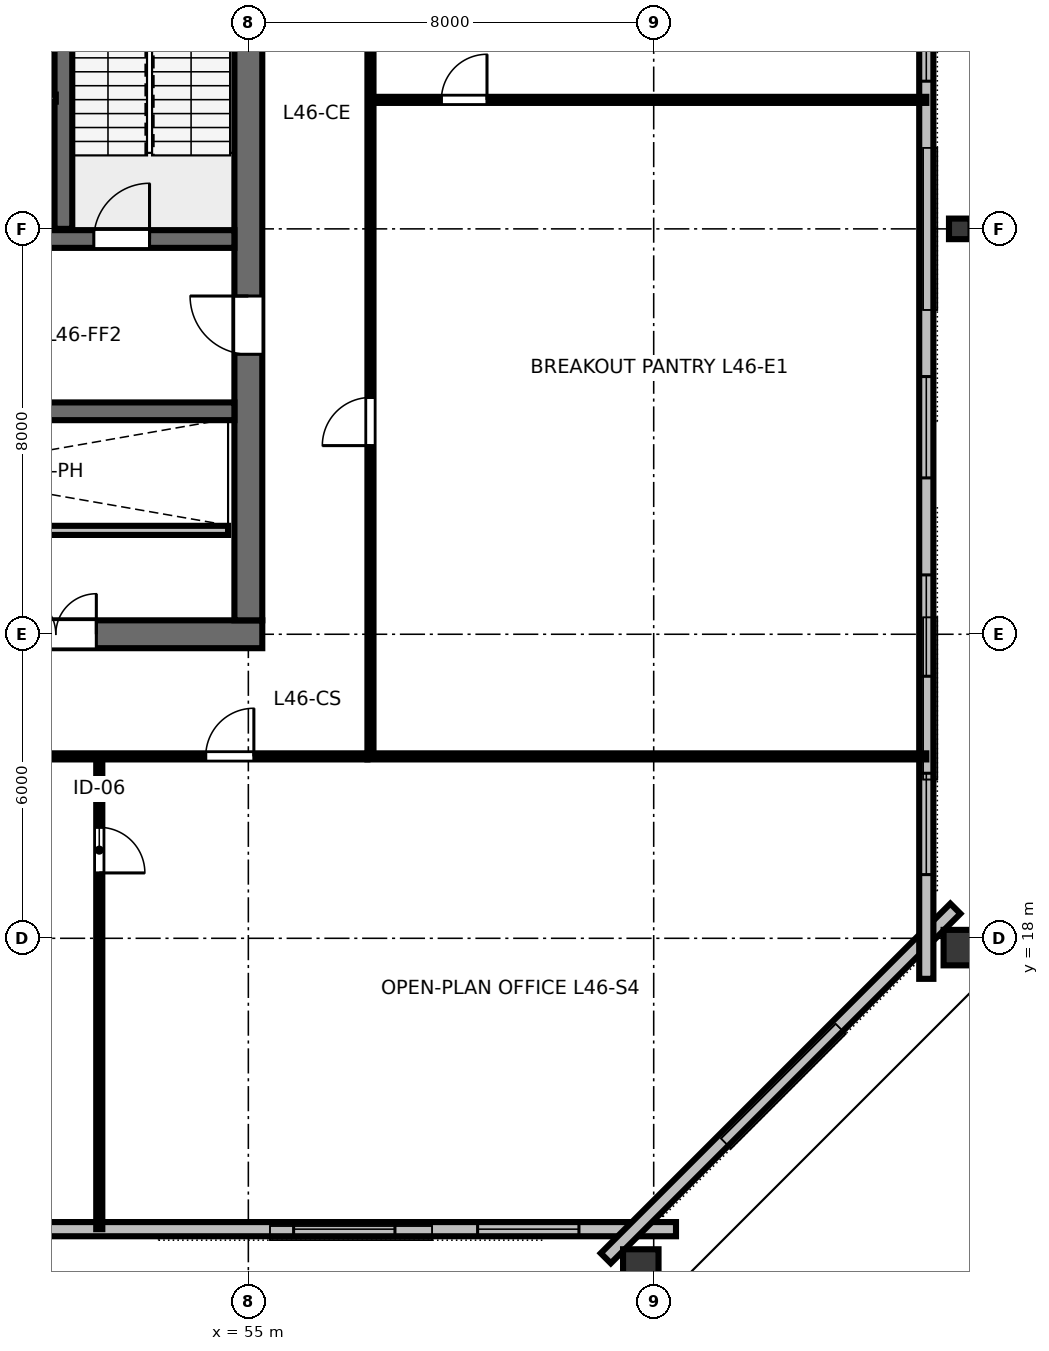
"""IFC4 building model, lengths in metres.
Left out: names, types, materials, properties, quantities, classifications, styles, units other than length and angle.
Written with IfcOpenShell. Run it as: python <this file> out.ifc"""

import sys

from ifc_helpers import new_model, si_unit, direction, frame, frame_2d, origin, origin_2d, place, context, subcontext, project, spatial, rectangle, hollow_rectangle, i_section, extrude, element, fill, save


model = new_model("IFC4")
c1 = context("Model", 3, precision=1e-05, world=origin(), true_north=direction((0.0, 1.0)))
c2 = subcontext(c1, "Body", "Model", "MODEL_VIEW")
j1 = project(units=[si_unit("LENGTHUNIT", "METRE"), si_unit("PLANEANGLEUNIT", "RADIAN")], contexts=[c1])
p1 = place(None, origin())
s1 = spatial("IfcSite", under=j1, at=p1, CompositionType="ELEMENT")
p2 = place(p1, origin())
s2 = spatial("IfcBuilding", under=s1, at=p2, CompositionType="ELEMENT")
p3 = place(p2, frame((0.0, 0.0, 177.0)))
s3 = spatial("IfcBuildingStorey", under=s2, at=p3, CompositionType="ELEMENT", Elevation=177.0)
p4 = place(p3, frame((36.725, 24.0, 0.0), z_axis=(0.0, 0.0, 1.0), x_axis=(1.0, 0.0, 0.0)))
e1 = element("IfcWall", 1, at=p4, inside=s3, PredefinedType="SHEAR", context=c2, shape_type="SweptSolid", body=[
    extrude(rectangle(XDim=18.55, YDim=0.55, at=frame_2d((9.275, 0.0))), origin(), (0.0, 0.0, 1.0), 3.36),
])
p5 = place(p4, frame((8.275, 0.0, 0.0)))
e2 = element("IfcOpeningElement", 2, at=p5, cuts=e1, PredefinedType="OPENING", context=c2, shape_type="SweptSolid", body=[
    extrude(rectangle(XDim=1.6, YDim=2.15, at=frame_2d((0.8, 1.075))), frame((0.0, 0.285, 0.0), z_axis=(0.0, -1.0, 0.0), x_axis=(1.0, 0.0, 0.0)), (0.0, 0.0, 1.0), 0.57),
])
p6 = place(p4, frame((13.675, 0.0, 0.0)))
e3 = element("IfcOpeningElement", 3, at=p6, cuts=e1, PredefinedType="OPENING", context=c2, shape_type="SweptSolid", body=[
    extrude(rectangle(XDim=1.6, YDim=2.15, at=frame_2d((0.8, 1.075))), frame((0.0, 0.285, 0.0), z_axis=(0.0, -1.0, 0.0), x_axis=(1.0, 0.0, 0.0)), (0.0, 0.0, 1.0), 0.57),
])
p7 = place(p3, frame((55.0, 24.275, 0.0), z_axis=(0.0, 0.0, 1.0), x_axis=(0.0, 1.0, 0.0)))
e4 = element("IfcWall", 4, at=p7, inside=s3, PredefinedType="SHEAR", context=c2, shape_type="SweptSolid", body=[
    extrude(rectangle(XDim=15.45, YDim=0.55, at=frame_2d((7.725, 0.0))), origin(), (0.0, 0.0, 1.0), 3.36),
])
p8 = place(p7, frame((5.25, 0.0, 0.0)))
e5 = element("IfcOpeningElement", 5, at=p8, cuts=e4, PredefinedType="OPENING", context=c2, shape_type="SweptSolid", body=[
    extrude(rectangle(XDim=1.15, YDim=2.15, at=frame_2d((0.575, 1.075))), frame((0.0, 0.285, 0.0), z_axis=(0.0, -1.0, 0.0), x_axis=(1.0, 0.0, 0.0)), (0.0, 0.0, 1.0), 0.57),
])
p9 = place(p3, frame((37.275, 31.8, 0.0), z_axis=(0.0, 0.0, 1.0), x_axis=(1.0, 0.0, 0.0)))
e6 = element("IfcWall", 6, at=p9, inside=s3, PredefinedType="SHEAR", context=c2, shape_type="SweptSolid", body=[
    extrude(rectangle(XDim=17.45, YDim=0.35, at=frame_2d((8.725, 0.0))), origin(), (0.0, 0.0, 1.0), 3.36),
])
p10 = place(p9, frame((0.775, 0.0, 0.0)))
e7 = element("IfcOpeningElement", 7, at=p10, cuts=e6, PredefinedType="OPENING", context=c2, shape_type="SweptSolid", body=[
    extrude(rectangle(XDim=1.1, YDim=2.15, at=frame_2d((0.55, 1.075))), frame((0.0, 0.185, 0.0), z_axis=(0.0, -1.0, 0.0), x_axis=(1.0, 0.0, 0.0)), (0.0, 0.0, 1.0), 0.37),
])
p11 = place(p9, frame((14.675, 0.0, 0.0)))
e8 = element("IfcOpeningElement", 8, at=p11, cuts=e6, PredefinedType="OPENING", context=c2, shape_type="SweptSolid", body=[
    extrude(rectangle(XDim=1.1, YDim=2.15, at=frame_2d((0.55, 1.075))), frame((0.0, 0.185, 0.0), z_axis=(0.0, -1.0, 0.0), x_axis=(1.0, 0.0, 0.0)), (0.0, 0.0, 1.0), 0.37),
])
p12 = place(p3, frame((37.275, 28.4, 0.0), z_axis=(0.0, 0.0, 1.0), x_axis=(1.0, 0.0, 0.0)))
e9 = element("IfcWall", 9, at=p12, inside=s3, PredefinedType="SHEAR", context=c2, shape_type="SweptSolid", body=[
    extrude(rectangle(XDim=17.45, YDim=0.35, at=frame_2d((8.725, 0.0))), origin(), (0.0, 0.0, 1.0), 3.36),
])
for number, where, z_axis, x_axis in (
    (10, (62.745, 11.438, 0.0), (0.0, 0.0, 1.0), (1.0, 0.0, 0.0)),
    (11, (69.146, 17.816, 0.0), (0.0, 0.0, 1.0), (0.0, 1.0, 0.0)),
):
    element("IfcColumn", number, at=place(p3, frame(where, z_axis=z_axis, x_axis=x_axis)), inside=s3, PredefinedType="COLUMN", context=c2, shape_type="SweptSolid", body=[
        extrude(hollow_rectangle(XDim=0.7, YDim=0.85, WallThickness=0.04, at=origin_2d()), origin(), (0.0, 0.0, 1.0), 3.358),
    ])
p13 = place(p3, frame((69.04, 32.0, 0.0), z_axis=(0.0, 0.0, 1.0), x_axis=(0.0, 1.0, 0.0)))
e12 = element("IfcColumn", 12, at=p13, inside=s3, PredefinedType="COLUMN", context=c2, shape_type="SweptSolid", body=[
    extrude(i_section(OverallWidth=0.406, OverallDepth=0.425, WebThickness=0.033, FlangeThickness=0.052, FilletRadius=0.025, at=origin_2d()), origin(), (0.0, 0.0, 1.0), 3.358),
])
p14 = place(p3, frame((28.56, 12.26, 0.0), z_axis=(0.0, 0.0, 1.0), x_axis=(1.0, 0.0, 0.0)))
e13 = element("IfcWall", 13, at=p14, inside=s3, PredefinedType="STANDARD", context=c2, shape_type="SweptSolid", body=[
    extrude(rectangle(XDim=34.88, YDim=0.28, at=frame_2d((17.44, 0.0))), origin(), (0.0, 0.0, 1.0), 3.36),
])
p15 = place(p14, frame((1.916, 0.0, 0.8)))
e14 = element("IfcOpeningElement", 14, at=p15, cuts=e13, PredefinedType="OPENING", context=c2, shape_type="SweptSolid", body=[
    extrude(rectangle(XDim=2.0, YDim=1.95, at=frame_2d((1.0, 0.975))), frame((0.0, 0.15, 0.0), z_axis=(0.0, -1.0, 0.0), x_axis=(1.0, 0.0, 0.0)), (0.0, 0.0, 1.0), 0.3),
])
p16 = place(p14, frame((5.547, 0.0, 0.8)))
e15 = element("IfcOpeningElement", 15, at=p16, cuts=e13, PredefinedType="OPENING", context=c2, shape_type="SweptSolid", body=[
    extrude(rectangle(XDim=2.0, YDim=1.95, at=frame_2d((1.0, 0.975))), frame((0.0, 0.15, 0.0), z_axis=(0.0, -1.0, 0.0), x_axis=(1.0, 0.0, 0.0)), (0.0, 0.0, 1.0), 0.3),
])
p17 = place(p14, frame((9.178, 0.0, 0.8)))
e16 = element("IfcOpeningElement", 16, at=p17, cuts=e13, PredefinedType="OPENING", context=c2, shape_type="SweptSolid", body=[
    extrude(rectangle(XDim=2.0, YDim=1.95, at=frame_2d((1.0, 0.975))), frame((0.0, 0.15, 0.0), z_axis=(0.0, -1.0, 0.0), x_axis=(1.0, 0.0, 0.0)), (0.0, 0.0, 1.0), 0.3),
])
p18 = place(p14, frame((20.071, 0.0, 0.8)))
e17 = element("IfcOpeningElement", 17, at=p18, cuts=e13, PredefinedType="OPENING", context=c2, shape_type="SweptSolid", body=[
    extrude(rectangle(XDim=2.0, YDim=1.95, at=frame_2d((1.0, 0.975))), frame((0.0, 0.15, 0.0), z_axis=(0.0, -1.0, 0.0), x_axis=(1.0, 0.0, 0.0)), (0.0, 0.0, 1.0), 0.3),
])
p19 = place(p14, frame((27.333, 0.0, 0.8)))
e18 = element("IfcOpeningElement", 18, at=p19, cuts=e13, PredefinedType="OPENING", context=c2, shape_type="SweptSolid", body=[
    extrude(rectangle(XDim=2.0, YDim=1.95, at=frame_2d((1.0, 0.975))), frame((0.0, 0.15, 0.0), z_axis=(0.0, -1.0, 0.0), x_axis=(1.0, 0.0, 0.0)), (0.0, 0.0, 1.0), 0.3),
])
p20 = place(p14, frame((30.964, 0.0, 0.8)))
e19 = element("IfcOpeningElement", 19, at=p20, cuts=e13, PredefinedType="OPENING", context=c2, shape_type="SweptSolid", body=[
    extrude(rectangle(XDim=2.0, YDim=1.95, at=frame_2d((1.0, 0.975))), frame((0.0, 0.15, 0.0), z_axis=(0.0, -1.0, 0.0), x_axis=(1.0, 0.0, 0.0)), (0.0, 0.0, 1.0), 0.3),
])
p21 = place(p3, frame((62.054, 11.686, 0.0), z_axis=(0.0, 0.0, 1.0), x_axis=(0.707106781187, 0.707106781187, 0.0)))
e20 = element("IfcWall", 20, at=p21, inside=s3, PredefinedType="STANDARD", context=c2, shape_type="SweptSolid", body=[
    extrude(rectangle(XDim=9.757, YDim=0.28, at=frame_2d((4.879, 0.0))), origin(), (0.0, 0.0, 1.0), 3.36),
])
p22 = place(p3, frame((68.38, 17.2, 0.0), z_axis=(0.0, 0.0, 1.0), x_axis=(0.0, 1.0, 0.0)))
e21 = element("IfcWall", 21, at=p22, inside=s3, PredefinedType="STANDARD", context=c2, shape_type="SweptSolid", body=[
    extrude(rectangle(XDim=29.6, YDim=0.28, at=frame_2d((14.8, 0.0))), origin(), (0.0, 0.0, 1.0), 3.36),
])
p23 = place(p22, frame((2.057, 0.0, 0.8)))
e22 = element("IfcOpeningElement", 22, at=p23, cuts=e21, PredefinedType="OPENING", context=c2, shape_type="SweptSolid", body=[
    extrude(rectangle(XDim=2.0, YDim=1.95, at=frame_2d((1.0, 0.975))), frame((0.0, 0.15, 0.0), z_axis=(0.0, -1.0, 0.0), x_axis=(1.0, 0.0, 0.0)), (0.0, 0.0, 1.0), 0.3),
])
p24 = place(p22, frame((5.971, 0.0, 0.8)))
e23 = element("IfcOpeningElement", 23, at=p24, cuts=e21, PredefinedType="OPENING", context=c2, shape_type="SweptSolid", body=[
    extrude(rectangle(XDim=2.0, YDim=1.95, at=frame_2d((1.0, 0.975))), frame((0.0, 0.15, 0.0), z_axis=(0.0, -1.0, 0.0), x_axis=(1.0, 0.0, 0.0)), (0.0, 0.0, 1.0), 0.3),
])
p25 = place(p22, frame((9.886, 0.0, 0.8)))
e24 = element("IfcOpeningElement", 24, at=p25, cuts=e21, PredefinedType="OPENING", context=c2, shape_type="SweptSolid", body=[
    extrude(rectangle(XDim=2.0, YDim=1.95, at=frame_2d((1.0, 0.975))), frame((0.0, 0.15, 0.0), z_axis=(0.0, -1.0, 0.0), x_axis=(1.0, 0.0, 0.0)), (0.0, 0.0, 1.0), 0.3),
])
p26 = place(p22, frame((17.714, 0.0, 0.8)))
e25 = element("IfcOpeningElement", 25, at=p26, cuts=e21, PredefinedType="OPENING", context=c2, shape_type="SweptSolid", body=[
    extrude(rectangle(XDim=2.0, YDim=1.95, at=frame_2d((1.0, 0.975))), frame((0.0, 0.15, 0.0), z_axis=(0.0, -1.0, 0.0), x_axis=(1.0, 0.0, 0.0)), (0.0, 0.0, 1.0), 0.3),
])
p27 = place(p22, frame((21.629, 0.0, 0.8)))
e26 = element("IfcOpeningElement", 26, at=p27, cuts=e21, PredefinedType="OPENING", context=c2, shape_type="SweptSolid", body=[
    extrude(rectangle(XDim=2.0, YDim=1.95, at=frame_2d((1.0, 0.975))), frame((0.0, 0.15, 0.0), z_axis=(0.0, -1.0, 0.0), x_axis=(1.0, 0.0, 0.0)), (0.0, 0.0, 1.0), 0.3),
])
p28 = place(p22, frame((25.543, 0.0, 0.8)))
e27 = element("IfcOpeningElement", 27, at=p28, cuts=e21, PredefinedType="OPENING", context=c2, shape_type="SweptSolid", body=[
    extrude(rectangle(XDim=2.0, YDim=1.95, at=frame_2d((1.0, 0.975))), frame((0.0, 0.15, 0.0), z_axis=(0.0, -1.0, 0.0), x_axis=(1.0, 0.0, 0.0)), (0.0, 0.0, 1.0), 0.3),
])
p29 = place(p3, frame((51.35, 32.0, 0.0), z_axis=(0.0, 0.0, 1.0), x_axis=(0.0, 1.0, 0.0)))
e28 = element("IfcWall", 28, at=p29, inside=s3, PredefinedType="SHEAR", context=c2, shape_type="SweptSolid", body=[
    extrude(rectangle(XDim=7.7, YDim=0.35, at=frame_2d((3.85, 0.0))), origin(), (0.0, 0.0, 1.0), 3.6),
])
p30 = place(p3, frame((48.8, 34.58, 0.0), z_axis=(0.0, 0.0, 1.0), x_axis=(1.0, 0.0, 0.0)))
e29 = element("IfcWall", 29, at=p30, inside=s3, PredefinedType="PARTITIONING", context=c2, shape_type="SweptSolid", body=[
    extrude(rectangle(XDim=2.4, YDim=0.14, at=frame_2d((1.2, 0.0))), origin(), (0.0, 0.0, 1.0), 3.36),
])
p31 = place(p3, frame((42.55, 26.05, 0.0), z_axis=(0.0, 0.0, 1.0), x_axis=(1.0, 0.0, 0.0)))
e30 = element("IfcWall", 30, at=p31, inside=s3, PredefinedType="PARTITIONING", context=c2, shape_type="SweptSolid", body=[
    extrude(rectangle(XDim=12.05, YDim=0.18, at=frame_2d((6.025, 0.0))), origin(), (0.0, 0.0, 1.0), 3.36),
])
p32 = place(p3, frame((52.058, 21.59, 0.0), z_axis=(0.0, 0.0, 1.0), x_axis=(0.0, -1.0, 0.0)))
e31 = element("IfcWall", 31, at=p32, inside=s3, PredefinedType="PARTITIONING", context=c2, shape_type="SweptSolid", body=[
    extrude(rectangle(XDim=9.33, YDim=0.12, at=frame_2d((4.665, 0.0))), origin(), (0.0, 0.0, 1.0), 2.64),
])
p33 = place(p32, frame((1.4, 0.0, 0.0)))
e32 = element("IfcOpeningElement", 32, at=p33, cuts=e31, PredefinedType="OPENING", context=c2, shape_type="SweptSolid", body=[
    extrude(rectangle(XDim=0.9, YDim=2.15, at=frame_2d((0.45, 1.075))), frame((0.0, 0.07, 0.0), z_axis=(0.0, -1.0, 0.0), x_axis=(1.0, 0.0, 0.0)), (0.0, 0.0, 1.0), 0.14),
])
p34 = place(p3, frame((47.02, 21.59, 0.0), z_axis=(0.0, 0.0, 1.0), x_axis=(1.0, 0.0, 0.0)))
e33 = element("IfcWall", 33, at=p34, inside=s3, PredefinedType="PARTITIONING", context=c2, shape_type="SweptSolid", body=[
    extrude(rectangle(XDim=10.33, YDim=0.12, at=frame_2d((5.165, 0.0))), origin(), (0.0, 0.0, 1.0), 2.64),
])
p35 = place(p34, frame((2.044, 0.0, 0.0)))
e34 = element("IfcOpeningElement", 34, at=p35, cuts=e33, PredefinedType="OPENING", context=c2, shape_type="SweptSolid", body=[
    extrude(rectangle(XDim=0.95, YDim=2.15, at=frame_2d((0.475, 1.075))), frame((0.0, 0.07, 0.0), z_axis=(0.0, -1.0, 0.0), x_axis=(1.0, 0.0, 0.0)), (0.0, 0.0, 1.0), 0.14),
])
p36 = place(p34, frame((7.139, 0.0, 0.0)))
e35 = element("IfcOpeningElement", 35, at=p36, cuts=e33, PredefinedType="OPENING", context=c2, shape_type="SweptSolid", body=[
    extrude(rectangle(XDim=0.95, YDim=2.15, at=frame_2d((0.475, 1.075))), frame((0.0, 0.07, 0.0), z_axis=(0.0, -1.0, 0.0), x_axis=(1.0, 0.0, 0.0)), (0.0, 0.0, 1.0), 0.14),
])
p37 = place(p3, frame((57.41, 34.546, 0.0), z_axis=(0.0, 0.0, 1.0), x_axis=(1.0, 0.0, 0.0)))
e36 = element("IfcWall", 36, at=p37, inside=s3, PredefinedType="PARTITIONING", context=c2, shape_type="SweptSolid", body=[
    extrude(rectangle(XDim=10.97, YDim=0.12, at=frame_2d((5.485, 0.0))), origin(), (0.0, 0.0, 1.0), 2.64),
])
p38 = place(p37, frame((1.4, 0.0, 0.0)))
e37 = element("IfcOpeningElement", 37, at=p38, cuts=e36, PredefinedType="OPENING", context=c2, shape_type="SweptSolid", body=[
    extrude(rectangle(XDim=0.9, YDim=2.15, at=frame_2d((0.45, 1.075))), frame((0.0, 0.07, 0.0), z_axis=(0.0, -1.0, 0.0), x_axis=(1.0, 0.0, 0.0)), (0.0, 0.0, 1.0), 0.14),
])
p39 = place(p3, frame((57.41, 21.65, 0.0), z_axis=(0.0, 0.0, 1.0), x_axis=(0.0, 1.0, 0.0)))
e38 = element("IfcWall", 38, at=p39, inside=s3, PredefinedType="PARTITIONING", context=c2, shape_type="SweptSolid", body=[
    extrude(rectangle(XDim=20.7, YDim=0.12, at=frame_2d((10.35, 0.0))), origin(), (0.0, 0.0, 1.0), 2.64),
])
p40 = place(p39, frame((6.073, 0.0, 0.0)))
e39 = element("IfcOpeningElement", 39, at=p40, cuts=e38, PredefinedType="OPENING", context=c2, shape_type="SweptSolid", body=[
    extrude(rectangle(XDim=0.95, YDim=2.15, at=frame_2d((0.475, 1.075))), frame((0.0, 0.07, 0.0), z_axis=(0.0, -1.0, 0.0), x_axis=(1.0, 0.0, 0.0)), (0.0, 0.0, 1.0), 0.14),
])
p41 = place(p39, frame((16.223, 0.0, 0.0)))
e40 = element("IfcOpeningElement", 40, at=p41, cuts=e38, PredefinedType="OPENING", context=c2, shape_type="SweptSolid", body=[
    extrude(rectangle(XDim=0.95, YDim=2.15, at=frame_2d((0.475, 1.075))), frame((0.0, 0.07, 0.0), z_axis=(0.0, -1.0, 0.0), x_axis=(1.0, 0.0, 0.0)), (0.0, 0.0, 1.0), 0.14),
])
p42 = place(p3, frame((57.35, 21.59, 0.0), z_axis=(0.0, 0.0, 1.0), x_axis=(1.0, 0.0, 0.0)))
e41 = element("IfcWall", 41, at=p42, inside=s3, PredefinedType="PARTITIONING", context=c2, shape_type="SweptSolid", body=[
    extrude(rectangle(XDim=11.03, YDim=0.12, at=frame_2d((5.515, 0.0))), origin(), (0.0, 0.0, 1.0), 2.64),
])
p43 = place(p19, origin())
e42 = element("IfcWindow", 42, at=p43, inside=s3, PartitioningType="SINGLE_PANEL", PredefinedType="WINDOW", context=c2, shape_type="SweptSolid", body=[
    extrude(rectangle(XDim=2.0, YDim=1.95, at=frame_2d((1.0, 0.975))), frame((0.0, 0.03, 0.0), z_axis=(0.0, -1.0, 0.0), x_axis=(1.0, 0.0, 0.0)), (0.0, 0.0, 1.0), 0.06),
])
fill(e18, e42)
p44 = place(p20, origin())
e43 = element("IfcWindow", 43, at=p44, inside=s3, PartitioningType="SINGLE_PANEL", PredefinedType="WINDOW", context=c2, shape_type="SweptSolid", body=[
    extrude(rectangle(XDim=2.0, YDim=1.95, at=frame_2d((1.0, 0.975))), frame((0.0, 0.03, 0.0), z_axis=(0.0, -1.0, 0.0), x_axis=(1.0, 0.0, 0.0)), (0.0, 0.0, 1.0), 0.06),
])
fill(e19, e43)
p45 = place(p23, origin())
e44 = element("IfcWindow", 44, at=p45, inside=s3, PartitioningType="SINGLE_PANEL", PredefinedType="WINDOW", context=c2, shape_type="SweptSolid", body=[
    extrude(rectangle(XDim=2.0, YDim=1.95, at=frame_2d((1.0, 0.975))), frame((0.0, 0.03, 0.0), z_axis=(0.0, -1.0, 0.0), x_axis=(1.0, 0.0, 0.0)), (0.0, 0.0, 1.0), 0.06),
])
fill(e22, e44)
p46 = place(p24, origin())
e45 = element("IfcWindow", 45, at=p46, inside=s3, PartitioningType="SINGLE_PANEL", PredefinedType="WINDOW", context=c2, shape_type="SweptSolid", body=[
    extrude(rectangle(XDim=2.0, YDim=1.95, at=frame_2d((1.0, 0.975))), frame((0.0, 0.03, 0.0), z_axis=(0.0, -1.0, 0.0), x_axis=(1.0, 0.0, 0.0)), (0.0, 0.0, 1.0), 0.06),
])
fill(e23, e45)
p47 = place(p25, origin())
e46 = element("IfcWindow", 46, at=p47, inside=s3, PartitioningType="SINGLE_PANEL", PredefinedType="WINDOW", context=c2, shape_type="SweptSolid", body=[
    extrude(rectangle(XDim=2.0, YDim=1.95, at=frame_2d((1.0, 0.975))), frame((0.0, 0.03, 0.0), z_axis=(0.0, -1.0, 0.0), x_axis=(1.0, 0.0, 0.0)), (0.0, 0.0, 1.0), 0.06),
])
fill(e24, e46)
p48 = place(p26, origin())
e47 = element("IfcWindow", 47, at=p48, inside=s3, PartitioningType="SINGLE_PANEL", PredefinedType="WINDOW", context=c2, shape_type="SweptSolid", body=[
    extrude(rectangle(XDim=2.0, YDim=1.95, at=frame_2d((1.0, 0.975))), frame((0.0, 0.03, 0.0), z_axis=(0.0, -1.0, 0.0), x_axis=(1.0, 0.0, 0.0)), (0.0, 0.0, 1.0), 0.06),
])
fill(e25, e47)
p49 = place(p11, origin())
e48 = element("IfcDoor", 48, at=p49, inside=s3, OperationType="SINGLE_SWING_RIGHT", PredefinedType="DOOR", context=c2, shape_type="SweptSolid", body=[
    extrude(rectangle(XDim=1.1, YDim=2.15, at=frame_2d((0.55, 1.075))), frame((0.0, 0.025, 0.0), z_axis=(0.0, -1.0, 0.0), x_axis=(1.0, 0.0, 0.0)), (0.0, 0.0, 1.0), 0.05),
])
fill(e8, e48)
p50 = place(p8, origin())
e49 = element("IfcDoor", 49, at=p50, inside=s3, OperationType="SINGLE_SWING_RIGHT", PredefinedType="DOOR", context=c2, shape_type="SweptSolid", body=[
    extrude(rectangle(XDim=1.15, YDim=2.15, at=frame_2d((0.575, 1.075))), frame((0.0, 0.025, 0.0), z_axis=(0.0, -1.0, 0.0), x_axis=(1.0, 0.0, 0.0)), (0.0, 0.0, 1.0), 0.05),
])
fill(e5, e49)
p51 = place(p6, origin())
e50 = element("IfcDoor", 50, at=p51, inside=s3, OperationType="DOUBLE_DOOR_SINGLE_SWING", PredefinedType="DOOR", context=c2, shape_type="SweptSolid", body=[
    extrude(rectangle(XDim=1.6, YDim=2.15, at=frame_2d((0.8, 1.075))), frame((0.0, 0.025, 0.0), z_axis=(0.0, -1.0, 0.0), x_axis=(1.0, 0.0, 0.0)), (0.0, 0.0, 1.0), 0.05),
])
fill(e3, e50)
p52 = place(p33, origin())
e51 = element("IfcDoor", 51, at=p52, inside=s3, OperationType="SINGLE_SWING_RIGHT", PredefinedType="DOOR", context=c2, shape_type="SweptSolid", body=[
    extrude(rectangle(XDim=0.9, YDim=2.15, at=frame_2d((0.45, 1.075))), frame((0.0, 0.025, 0.0), z_axis=(0.0, -1.0, 0.0), x_axis=(1.0, 0.0, 0.0)), (0.0, 0.0, 1.0), 0.05),
])
fill(e32, e51)
p53 = place(p36, origin())
e52 = element("IfcDoor", 52, at=p53, inside=s3, OperationType="SINGLE_SWING_RIGHT", PredefinedType="DOOR", context=c2, shape_type="SweptSolid", body=[
    extrude(rectangle(XDim=0.95, YDim=2.15, at=frame_2d((0.475, 1.075))), frame((0.0, 0.025, 0.0), z_axis=(0.0, -1.0, 0.0), x_axis=(1.0, 0.0, 0.0)), (0.0, 0.0, 1.0), 0.05),
])
fill(e35, e52)
p54 = place(p38, origin())
e53 = element("IfcDoor", 53, at=p54, inside=s3, OperationType="SINGLE_SWING_RIGHT", PredefinedType="DOOR", context=c2, shape_type="SweptSolid", body=[
    extrude(rectangle(XDim=0.9, YDim=2.15, at=frame_2d((0.45, 1.075))), frame((0.0, 0.025, 0.0), z_axis=(0.0, -1.0, 0.0), x_axis=(1.0, 0.0, 0.0)), (0.0, 0.0, 1.0), 0.05),
])
fill(e37, e53)
p55 = place(p40, origin())
e54 = element("IfcDoor", 54, at=p55, inside=s3, OperationType="SINGLE_SWING_LEFT", PredefinedType="DOOR", context=c2, shape_type="SweptSolid", body=[
    extrude(rectangle(XDim=0.95, YDim=2.15, at=frame_2d((0.475, 1.075))), frame((0.0, 0.025, 0.0), z_axis=(0.0, -1.0, 0.0), x_axis=(1.0, 0.0, 0.0)), (0.0, 0.0, 1.0), 0.05),
])
fill(e39, e54)
save(model, sys.argv[1])
